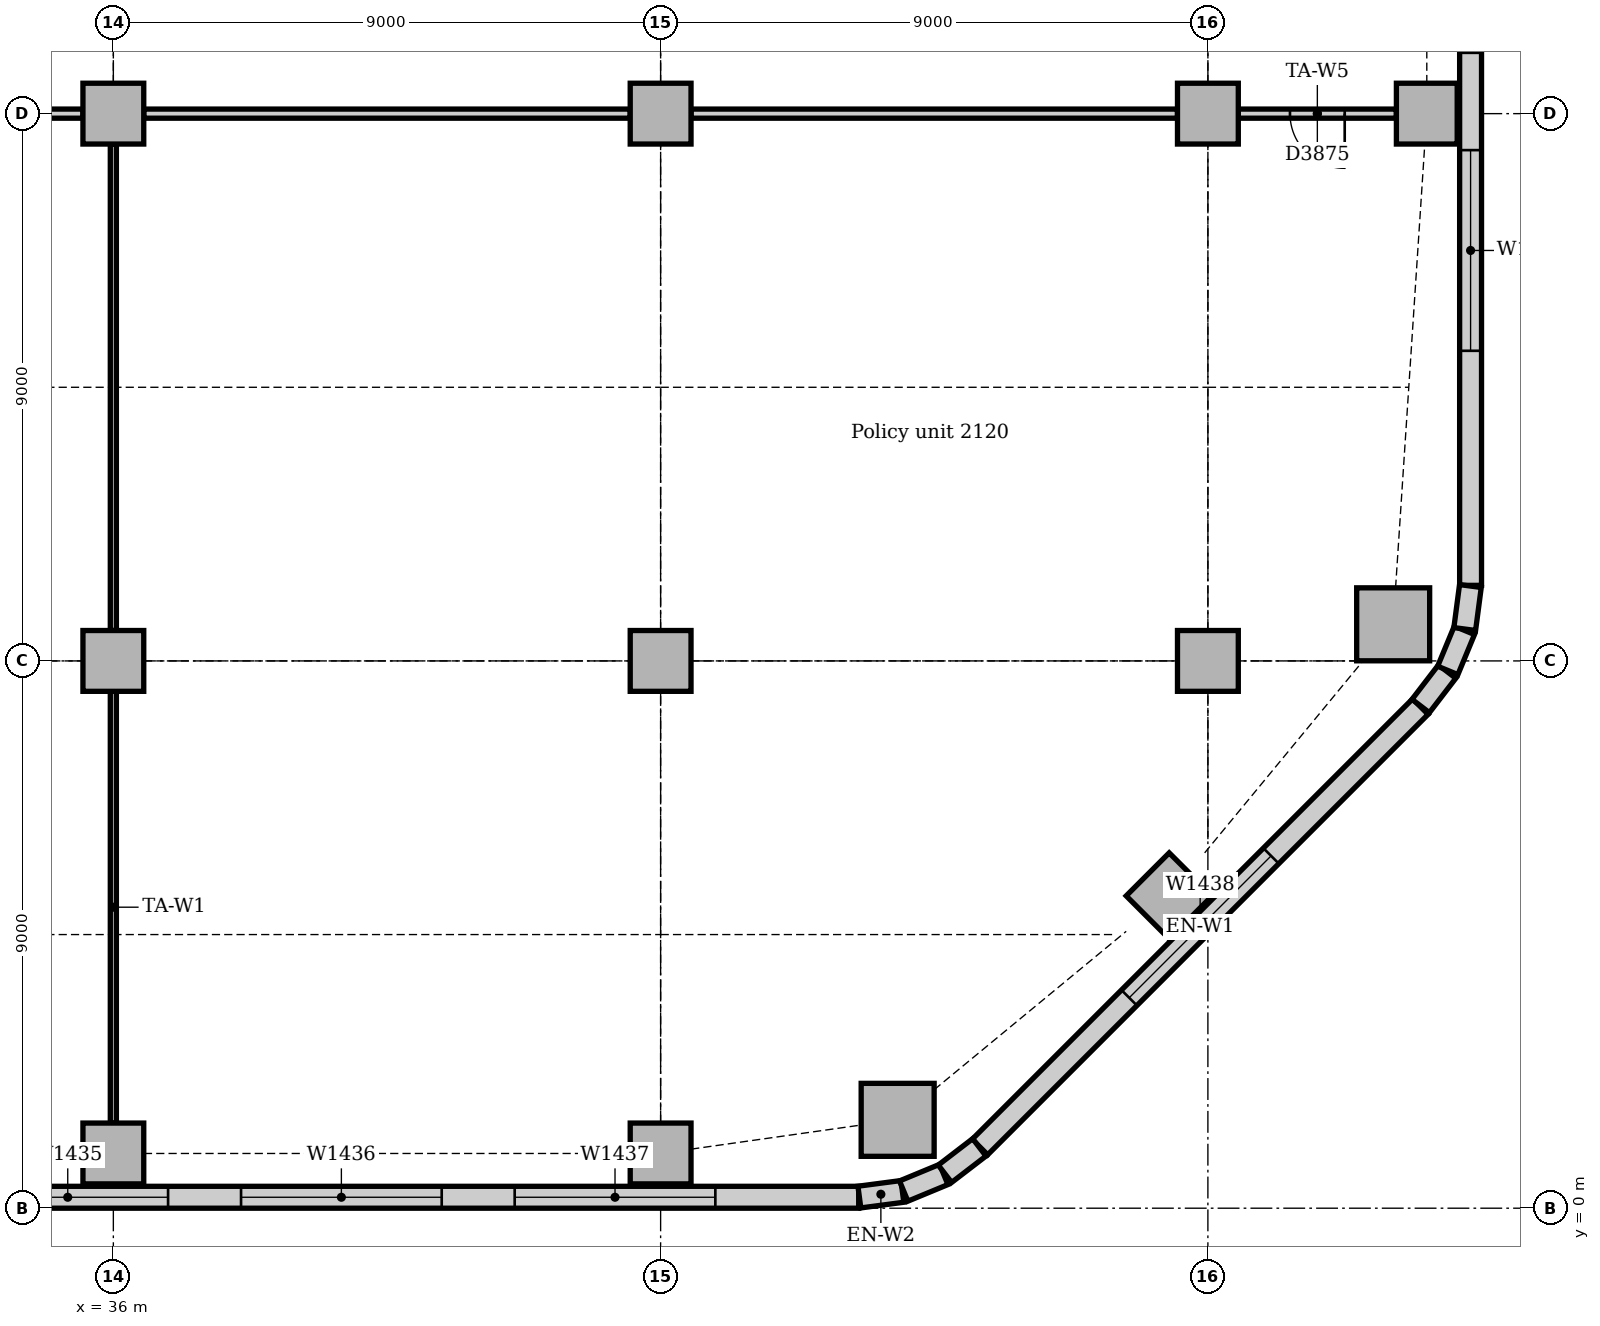
"""IFC4 building model, lengths in metres.
Left out: names, types, materials, properties, quantities, classifications, styles, units other than length and angle.
Written with IfcOpenShell. Run it as: python <this file> out.ifc"""

import sys

from ifc_helpers import new_model, si_unit, direction, frame, frame_2d, origin, origin_2d, place, context, subcontext, project, spatial, rectangle, extrude, element, fill, save


model = new_model("IFC4")
c1 = context("Model", 3, precision=1e-05, world=origin(), true_north=direction((0.0, 1.0)))
c2 = subcontext(c1, "Body", "Model", "MODEL_VIEW")
j1 = project(units=[si_unit("LENGTHUNIT", "METRE"), si_unit("PLANEANGLEUNIT", "RADIAN")], contexts=[c1])
p1 = place(None, origin())
s1 = spatial("IfcSite", under=j1, at=p1, CompositionType="ELEMENT")
p2 = place(p1, origin())
s2 = spatial("IfcBuilding", under=s1, at=p2, CompositionType="ELEMENT")
p3 = place(p2, frame((0.0, 0.0, 91.0)))
s3 = spatial("IfcBuildingStorey", under=s2, at=p3, CompositionType="ELEMENT", Elevation=91.0)
for number, where, z_axis, x_axis in (
    (1, (48.898, 1.453, 0.0), (0.0, 0.0, 1.0), (1.0, 0.0, 0.0)),
    (2, (57.047, 9.602, 0.0), (0.0, 0.0, 1.0), (1.0, 0.0, 0.0)),
):
    element("IfcColumn", number, at=place(p3, frame(where, z_axis=z_axis, x_axis=x_axis)), inside=s3, PredefinedType="COLUMN", context=c2, shape_type="SweptSolid", body=[
        extrude(rectangle(XDim=1.2, YDim=1.2, at=origin_2d()), origin(), (0.0, 0.0, 1.0), 3.7),
    ])
for number, where, z_axis, x_axis in (
    (3, (36.0, 0.9, 0.0), (0.0, 0.0, 1.0), (1.0, 0.0, 0.0)),
    (4, (45.0, 0.9, 0.0), (0.0, 0.0, 1.0), (1.0, 0.0, 0.0)),
    (5, (53.364, 5.136, 0.0), (0.0, 0.0, 1.0), (0.707, 0.707, 0.0)),
    (6, (57.6, 18.0, 0.0), (0.0, 0.0, 1.0), (1.0, 0.0, 0.0)),
    (7, (36.0, 9.0, 0.0), (0.0, 0.0, 1.0), (1.0, 0.0, 0.0)),
    (8, (36.0, 18.0, 0.0), (0.0, 0.0, 1.0), (1.0, 0.0, 0.0)),
    (9, (45.0, 9.0, 0.0), (0.0, 0.0, 1.0), (1.0, 0.0, 0.0)),
    (10, (45.0, 18.0, 0.0), (0.0, 0.0, 1.0), (1.0, 0.0, 0.0)),
    (11, (54.0, 9.0, 0.0), (0.0, 0.0, 1.0), (1.0, 0.0, 0.0)),
    (12, (54.0, 18.0, 0.0), (0.0, 0.0, 1.0), (1.0, 0.0, 0.0)),
):
    element("IfcColumn", number, at=place(p3, frame(where, z_axis=z_axis, x_axis=x_axis)), inside=s3, PredefinedType="COLUMN", context=c2, shape_type="SweptSolid", body=[
        extrude(rectangle(XDim=1.0, YDim=1.0, at=origin_2d()), origin(), (0.0, 0.0, 1.0), 3.7),
    ])
p4 = place(p3, frame((4.243, 0.18, 0.0), z_axis=(0.0, 0.0, 1.0), x_axis=(1.0, 0.0, 0.0)))
e13 = element("IfcWall", 13, at=p4, inside=s3, PredefinedType="STANDARD", context=c2, shape_type="SweptSolid", body=[
    extrude(rectangle(XDim=44.015, YDim=0.36, at=frame_2d((22.007, 0.0))), origin(), (0.0, 0.0, 1.0), 3.7),
])
p5 = place(p4, frame((2.357, 0.0, 0.9)))
e14 = element("IfcOpeningElement", 14, at=p5, cuts=e13, PredefinedType="OPENING", context=c2, shape_type="SweptSolid", body=[
    extrude(rectangle(XDim=3.3, YDim=1.6, at=frame_2d((1.65, 0.8))), frame((0.0, 0.19, 0.0), z_axis=(0.0, -1.0, 0.0), x_axis=(1.0, 0.0, 0.0)), (0.0, 0.0, 1.0), 0.38),
])
p6 = place(p4, frame((6.857, 0.0, 0.9)))
e15 = element("IfcOpeningElement", 15, at=p6, cuts=e13, PredefinedType="OPENING", context=c2, shape_type="SweptSolid", body=[
    extrude(rectangle(XDim=3.3, YDim=1.6, at=frame_2d((1.65, 0.8))), frame((0.0, 0.19, 0.0), z_axis=(0.0, -1.0, 0.0), x_axis=(1.0, 0.0, 0.0)), (0.0, 0.0, 1.0), 0.38),
])
p7 = place(p4, frame((11.357, 0.0, 0.9)))
e16 = element("IfcOpeningElement", 16, at=p7, cuts=e13, PredefinedType="OPENING", context=c2, shape_type="SweptSolid", body=[
    extrude(rectangle(XDim=3.3, YDim=1.6, at=frame_2d((1.65, 0.8))), frame((0.0, 0.19, 0.0), z_axis=(0.0, -1.0, 0.0), x_axis=(1.0, 0.0, 0.0)), (0.0, 0.0, 1.0), 0.38),
])
p8 = place(p4, frame((15.857, 0.0, 0.9)))
e17 = element("IfcOpeningElement", 17, at=p8, cuts=e13, PredefinedType="OPENING", context=c2, shape_type="SweptSolid", body=[
    extrude(rectangle(XDim=3.3, YDim=1.6, at=frame_2d((1.65, 0.8))), frame((0.0, 0.19, 0.0), z_axis=(0.0, -1.0, 0.0), x_axis=(1.0, 0.0, 0.0)), (0.0, 0.0, 1.0), 0.38),
])
p9 = place(p4, frame((20.357, 0.0, 0.9)))
e18 = element("IfcOpeningElement", 18, at=p9, cuts=e13, PredefinedType="OPENING", context=c2, shape_type="SweptSolid", body=[
    extrude(rectangle(XDim=3.3, YDim=1.6, at=frame_2d((1.65, 0.8))), frame((0.0, 0.19, 0.0), z_axis=(0.0, -1.0, 0.0), x_axis=(1.0, 0.0, 0.0)), (0.0, 0.0, 1.0), 0.38),
])
p10 = place(p4, frame((24.857, 0.0, 0.9)))
e19 = element("IfcOpeningElement", 19, at=p10, cuts=e13, PredefinedType="OPENING", context=c2, shape_type="SweptSolid", body=[
    extrude(rectangle(XDim=3.3, YDim=1.6, at=frame_2d((1.65, 0.8))), frame((0.0, 0.19, 0.0), z_axis=(0.0, -1.0, 0.0), x_axis=(1.0, 0.0, 0.0)), (0.0, 0.0, 1.0), 0.38),
])
p11 = place(p4, frame((29.357, 0.0, 0.9)))
e20 = element("IfcOpeningElement", 20, at=p11, cuts=e13, PredefinedType="OPENING", context=c2, shape_type="SweptSolid", body=[
    extrude(rectangle(XDim=3.3, YDim=1.6, at=frame_2d((1.65, 0.8))), frame((0.0, 0.19, 0.0), z_axis=(0.0, -1.0, 0.0), x_axis=(1.0, 0.0, 0.0)), (0.0, 0.0, 1.0), 0.38),
])
p12 = place(p4, frame((33.857, 0.0, 0.9)))
e21 = element("IfcOpeningElement", 21, at=p12, cuts=e13, PredefinedType="OPENING", context=c2, shape_type="SweptSolid", body=[
    extrude(rectangle(XDim=3.3, YDim=1.6, at=frame_2d((1.65, 0.8))), frame((0.0, 0.19, 0.0), z_axis=(0.0, -1.0, 0.0), x_axis=(1.0, 0.0, 0.0)), (0.0, 0.0, 1.0), 0.38),
])
p13 = place(p4, frame((38.357, 0.0, 0.9)))
e22 = element("IfcOpeningElement", 22, at=p13, cuts=e13, PredefinedType="OPENING", context=c2, shape_type="SweptSolid", body=[
    extrude(rectangle(XDim=3.3, YDim=1.6, at=frame_2d((1.65, 0.8))), frame((0.0, 0.19, 0.0), z_axis=(0.0, -1.0, 0.0), x_axis=(1.0, 0.0, 0.0)), (0.0, 0.0, 1.0), 0.38),
])
p14 = place(p3, frame((50.251, 1.006, 0.0), z_axis=(0.0, 0.0, 1.0), x_axis=(0.707106781187, 0.707106781187, 0.0)))
e23 = element("IfcWall", 23, at=p14, inside=s3, PredefinedType="STANDARD", context=c2, shape_type="SweptSolid", body=[
    extrude(rectangle(XDim=10.243, YDim=0.36, at=frame_2d((5.121, 0.0))), origin(), (0.0, 0.0, 1.0), 3.7),
])
p15 = place(p14, frame((3.471, 0.0, 0.9)))
e24 = element("IfcOpeningElement", 24, at=p15, cuts=e23, PredefinedType="OPENING", context=c2, shape_type="SweptSolid", body=[
    extrude(rectangle(XDim=3.3, YDim=1.6, at=frame_2d((1.65, 0.8))), frame((0.0, 0.19, 0.0), z_axis=(0.0, -1.0, 0.0), x_axis=(1.0, 0.0, 0.0)), (0.0, 0.0, 1.0), 0.38),
])
p16 = place(p3, frame((58.32, 10.243, 0.0), z_axis=(0.0, 0.0, 1.0), x_axis=(0.0, 1.0, 0.0)))
e25 = element("IfcWall", 25, at=p16, inside=s3, PredefinedType="STANDARD", context=c2, shape_type="SweptSolid", body=[
    extrude(rectangle(XDim=24.515, YDim=0.36, at=frame_2d((12.257, 0.0))), origin(), (0.0, 0.0, 1.0), 3.7),
])
p17 = place(p16, frame((3.857, 0.0, 0.9)))
e26 = element("IfcOpeningElement", 26, at=p17, cuts=e25, PredefinedType="OPENING", context=c2, shape_type="SweptSolid", body=[
    extrude(rectangle(XDim=3.3, YDim=1.6, at=frame_2d((1.65, 0.8))), frame((0.0, 0.19, 0.0), z_axis=(0.0, -1.0, 0.0), x_axis=(1.0, 0.0, 0.0)), (0.0, 0.0, 1.0), 0.38),
])
p18 = place(p16, frame((8.757, 0.0, 0.9)))
e27 = element("IfcOpeningElement", 27, at=p18, cuts=e25, PredefinedType="OPENING", context=c2, shape_type="SweptSolid", body=[
    extrude(rectangle(XDim=1.8, YDim=1.6, at=frame_2d((0.9, 0.8))), frame((0.0, 0.19, 0.0), z_axis=(0.0, -1.0, 0.0), x_axis=(1.0, 0.0, 0.0)), (0.0, 0.0, 1.0), 0.38),
])
p19 = place(p16, frame((12.857, 0.0, 0.9)))
e28 = element("IfcOpeningElement", 28, at=p19, cuts=e25, PredefinedType="OPENING", context=c2, shape_type="SweptSolid", body=[
    extrude(rectangle(XDim=3.3, YDim=1.6, at=frame_2d((1.65, 0.8))), frame((0.0, 0.19, 0.0), z_axis=(0.0, -1.0, 0.0), x_axis=(1.0, 0.0, 0.0)), (0.0, 0.0, 1.0), 0.38),
])
p20 = place(p16, frame((17.357, 0.0, 0.9)))
e29 = element("IfcOpeningElement", 29, at=p20, cuts=e25, PredefinedType="OPENING", context=c2, shape_type="SweptSolid", body=[
    extrude(rectangle(XDim=3.3, YDim=1.6, at=frame_2d((1.65, 0.8))), frame((0.0, 0.19, 0.0), z_axis=(0.0, -1.0, 0.0), x_axis=(1.0, 0.0, 0.0)), (0.0, 0.0, 1.0), 0.38),
])
for number, where, z_axis, x_axis in (
    (30, (48.269, 0.183, 0.0), (0.0, 0.0, 1.0), (0.991, 0.131, 0.0)),
    (31, (48.997, 0.282, 0.0), (0.0, 0.0, 1.0), (0.924, 0.383, 0.0)),
):
    element("IfcWall", number, at=place(p3, frame(where, z_axis=z_axis, x_axis=x_axis)), inside=s3, PredefinedType="STANDARD", context=c2, shape_type="SweptSolid", body=[
        extrude(rectangle(XDim=0.713, YDim=0.36, at=frame_2d((0.356, 0.0))), origin(), (0.0, 0.0, 1.0), 3.7),
    ])
for number, where, z_axis, x_axis in (
    (32, (49.675, 0.566, 0.0), (0.0, 0.0, 1.0), (0.793, 0.609, 0.0)),
    (33, (57.5, 8.259, 0.0), (0.0, 0.0, 1.0), (0.609, 0.793, 0.0)),
):
    element("IfcWall", number, at=place(p3, frame(where, z_axis=z_axis, x_axis=x_axis)), inside=s3, PredefinedType="STANDARD", context=c2, shape_type="SweptSolid", body=[
        extrude(rectangle(XDim=0.713, YDim=0.36, at=frame_2d((0.357, 0.0))), origin(), (0.0, 0.0, 1.0), 3.7),
    ])
for number, where, z_axis, x_axis in (
    (34, (57.945, 8.844, 0.0), (0.0, 0.0, 1.0), (0.383, 0.924, 0.0)),
    (35, (58.224, 9.524, 0.0), (0.0, 0.0, 1.0), (0.131, 0.991, 0.0)),
):
    element("IfcWall", number, at=place(p3, frame(where, z_axis=z_axis, x_axis=x_axis)), inside=s3, PredefinedType="STANDARD", context=c2, shape_type="SweptSolid", body=[
        extrude(rectangle(XDim=0.713, YDim=0.36, at=frame_2d((0.356, 0.0))), origin(), (0.0, 0.0, 1.0), 3.7),
    ])
p21 = place(p3, frame((54.5, 18.0, 0.0), z_axis=(0.0, 0.0, 1.0), x_axis=(1.0, 0.0, 0.0)))
e36 = element("IfcWall", 36, at=p21, inside=s3, PredefinedType="PARTITIONING", context=c2, shape_type="SweptSolid", body=[
    extrude(rectangle(XDim=2.6, YDim=0.15, at=frame_2d((1.3, 0.0))), origin(), (0.0, 0.0, 1.0), 3.452),
])
p22 = place(p21, frame((0.85, 0.0, 0.0)))
e37 = element("IfcOpeningElement", 37, at=p22, cuts=e36, PredefinedType="OPENING", context=c2, shape_type="SweptSolid", body=[
    extrude(rectangle(XDim=0.9, YDim=2.1, at=frame_2d((0.45, 1.05))), frame((0.0, 0.085, 0.0), z_axis=(0.0, -1.0, 0.0), x_axis=(1.0, 0.0, 0.0)), (0.0, 0.0, 1.0), 0.17),
])
for number, where, z_axis, x_axis in (
    (38, (45.5, 18.0, 0.0), (0.0, 0.0, 1.0), (1.0, 0.0, 0.0)),
    (39, (36.5, 18.0, 0.0), (0.0, 0.0, 1.0), (1.0, 0.0, 0.0)),
):
    element("IfcWall", number, at=place(p3, frame(where, z_axis=z_axis, x_axis=x_axis)), inside=s3, PredefinedType="PARTITIONING", context=c2, shape_type="SweptSolid", body=[
        extrude(rectangle(XDim=8.0, YDim=0.15, at=frame_2d((4.0, 0.0))), origin(), (0.0, 0.0, 1.0), 3.0),
    ])
p23 = place(p3, frame((27.5, 18.0, 0.0), z_axis=(0.0, 0.0, 1.0), x_axis=(1.0, 0.0, 0.0)))
e40 = element("IfcWall", 40, at=p23, inside=s3, PredefinedType="PARTITIONING", context=c2, shape_type="SweptSolid", body=[
    extrude(rectangle(XDim=8.0, YDim=0.15, at=frame_2d((4.0, 0.0))), origin(), (0.0, 0.0, 1.0), 3.0),
])
p24 = place(p23, frame((3.55, 0.0, 0.0)))
e41 = element("IfcOpeningElement", 41, at=p24, cuts=e40, PredefinedType="OPENING", context=c2, shape_type="SweptSolid", body=[
    extrude(rectangle(XDim=0.9, YDim=2.1, at=frame_2d((0.45, 1.05))), frame((0.0, 0.085, 0.0), z_axis=(0.0, -1.0, 0.0), x_axis=(1.0, 0.0, 0.0)), (0.0, 0.0, 1.0), 0.17),
])
p25 = place(p3, frame((36.0, 1.4, 0.0), z_axis=(0.0, 0.0, 1.0), x_axis=(0.0, 1.0, 0.0)))
e42 = element("IfcWall", 42, at=p25, inside=s3, PredefinedType="PARTITIONING", context=c2, shape_type="SweptSolid", body=[
    extrude(rectangle(XDim=7.1, YDim=0.1, at=frame_2d((3.55, 0.0))), origin(), (0.0, 0.0, 1.0), 3.008),
])
p26 = place(p3, frame((36.0, 9.5, 0.0), z_axis=(0.0, 0.0, 1.0), x_axis=(0.0, 1.0, 0.0)))
e43 = element("IfcWall", 43, at=p26, inside=s3, PredefinedType="PARTITIONING", context=c2, shape_type="SweptSolid", body=[
    extrude(rectangle(XDim=8.0, YDim=0.1, at=frame_2d((4.0, 0.0))), origin(), (0.0, 0.0, 1.0), 3.008),
])
p27 = place(p11, origin())
e44 = element("IfcWindow", 44, at=p27, inside=s3, PartitioningType="SINGLE_PANEL", PredefinedType="WINDOW", context=c2, shape_type="SweptSolid", body=[
    extrude(rectangle(XDim=3.3, YDim=1.6, at=frame_2d((1.65, 0.8))), frame((0.0, 0.13, 0.0), z_axis=(0.0, -1.0, 0.0), x_axis=(1.0, 0.0, 0.0)), (0.0, 0.0, 1.0), 0.06),
])
fill(e20, e44)
p28 = place(p12, origin())
e45 = element("IfcWindow", 45, at=p28, inside=s3, PartitioningType="SINGLE_PANEL", PredefinedType="WINDOW", context=c2, shape_type="SweptSolid", body=[
    extrude(rectangle(XDim=3.3, YDim=1.6, at=frame_2d((1.65, 0.8))), frame((0.0, 0.13, 0.0), z_axis=(0.0, -1.0, 0.0), x_axis=(1.0, 0.0, 0.0)), (0.0, 0.0, 1.0), 0.06),
])
fill(e21, e45)
p29 = place(p13, origin())
e46 = element("IfcWindow", 46, at=p29, inside=s3, PartitioningType="SINGLE_PANEL", PredefinedType="WINDOW", context=c2, shape_type="SweptSolid", body=[
    extrude(rectangle(XDim=3.3, YDim=1.6, at=frame_2d((1.65, 0.8))), frame((0.0, 0.13, 0.0), z_axis=(0.0, -1.0, 0.0), x_axis=(1.0, 0.0, 0.0)), (0.0, 0.0, 1.0), 0.06),
])
fill(e22, e46)
p30 = place(p15, origin())
e47 = element("IfcWindow", 47, at=p30, inside=s3, PartitioningType="SINGLE_PANEL", PredefinedType="WINDOW", context=c2, shape_type="SweptSolid", body=[
    extrude(rectangle(XDim=3.3, YDim=1.6, at=frame_2d((1.65, 0.8))), frame((0.0, 0.13, 0.0), z_axis=(0.0, -1.0, 0.0), x_axis=(1.0, 0.0, 0.0)), (0.0, 0.0, 1.0), 0.06),
])
fill(e24, e47)
p31 = place(p17, origin())
e48 = element("IfcWindow", 48, at=p31, inside=s3, PartitioningType="SINGLE_PANEL", PredefinedType="WINDOW", context=c2, shape_type="SweptSolid", body=[
    extrude(rectangle(XDim=3.3, YDim=1.6, at=frame_2d((1.65, 0.8))), frame((0.0, 0.13, 0.0), z_axis=(0.0, -1.0, 0.0), x_axis=(1.0, 0.0, 0.0)), (0.0, 0.0, 1.0), 0.06),
])
fill(e26, e48)
p32 = place(p22, frame((0.9, 0.0, 0.0), z_axis=(0.0, 0.0, 1.0), x_axis=(-1.0, 0.0, 0.0)))
e49 = element("IfcDoor", 49, at=p32, inside=s3, OperationType="SINGLE_SWING_LEFT", PredefinedType="DOOR", context=c2, shape_type="SweptSolid", body=[
    extrude(rectangle(XDim=0.9, YDim=2.1, at=frame_2d((0.45, 1.05))), frame((0.0, 0.025, 0.0), z_axis=(0.0, -1.0, 0.0), x_axis=(1.0, 0.0, 0.0)), (0.0, 0.0, 1.0), 0.05),
])
fill(e37, e49)
save(model, sys.argv[1])
